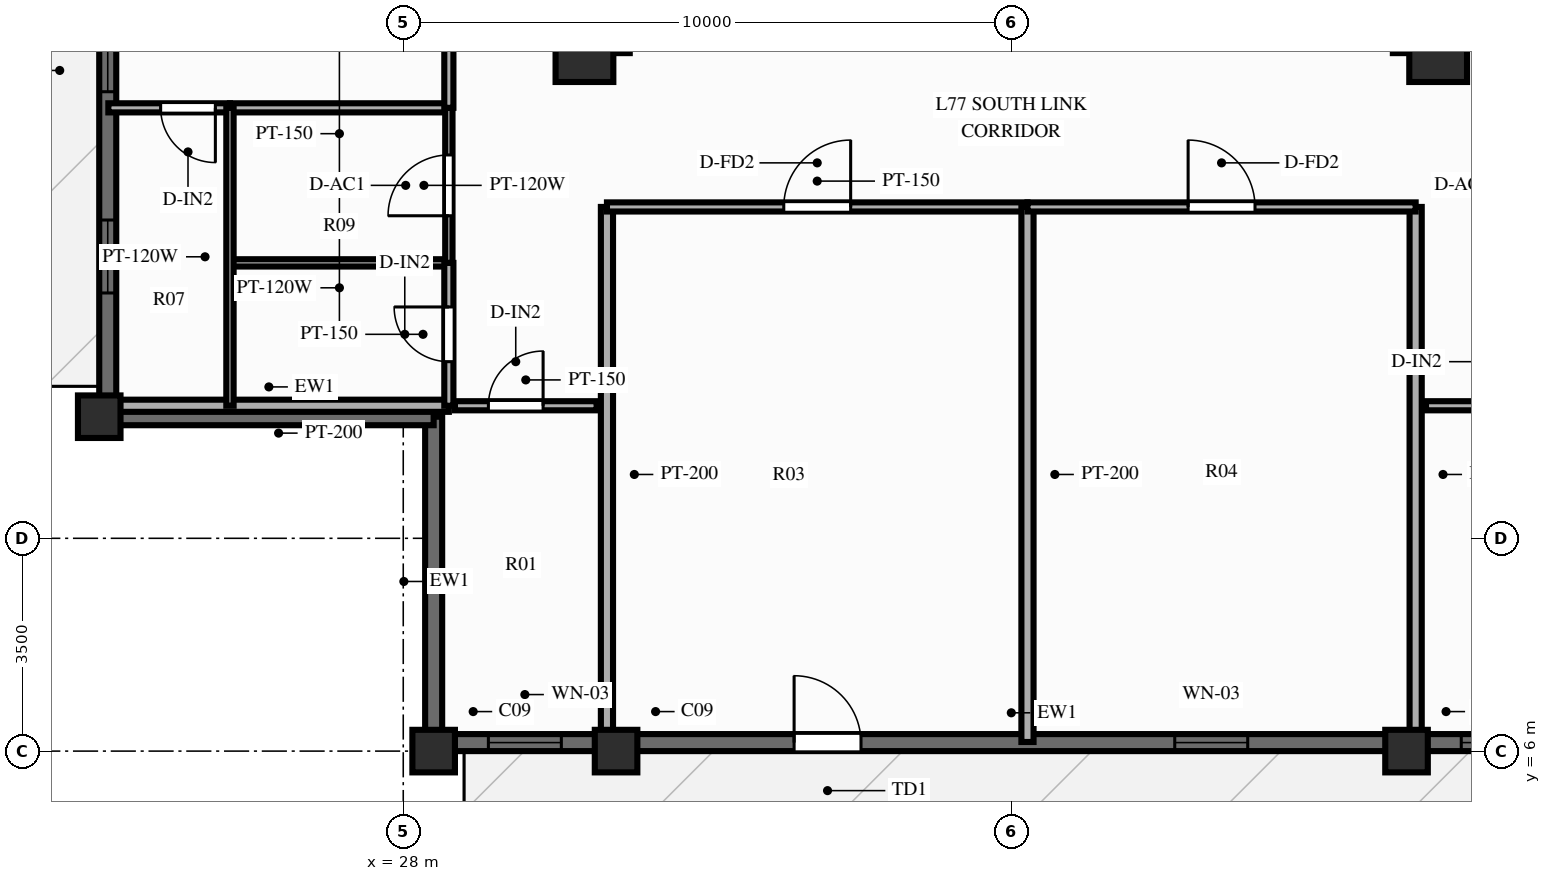
"""IFC4 building model, lengths in metres.
Left out: names, types, materials, properties, quantities, classifications, styles, units other than length and angle.
Written with IfcOpenShell. Run it as: python <this file> out.ifc"""

import sys

from ifc_helpers import new_model, si_unit, direction, frame, frame_2d, origin, origin_2d, place, context, subcontext, project, spatial, rectangle, extrude, source, transform, mapped, element, fill, save


model = new_model("IFC4")
c1 = context("Model", 3, precision=1e-05, world=origin(), true_north=direction((0.0, 1.0)))
c2 = subcontext(c1, "Body", "Model", "MODEL_VIEW")
j1 = project(units=[si_unit("LENGTHUNIT", "METRE"), si_unit("PLANEANGLEUNIT", "RADIAN")], contexts=[c1])
p1 = place(None, origin())
s1 = spatial("IfcSite", under=j1, at=p1, CompositionType="ELEMENT")
p2 = place(p1, origin())
s2 = spatial("IfcBuilding", under=s1, at=p2, CompositionType="ELEMENT")
p3 = place(p2, frame((0.0, 0.0, 249.0)))
s3 = spatial("IfcBuildingStorey", under=s2, at=p3, CompositionType="ELEMENT", Elevation=249.0)
p4 = place(p3, frame((31.5, 17.48, 0.0), z_axis=(0.0, 0.0, 1.0), x_axis=(0.0, 1.0, 0.0)))
e1 = element("IfcWall", 1, at=p4, inside=s3, PredefinedType="SHEAR", context=c2, shape_type="SweptSolid", body=[
    extrude(rectangle(XDim=19.04, YDim=0.45, at=frame_2d((9.52, 0.0))), origin(), (0.0, 0.0, 1.0), 3.2),
])
p5 = place(p4, frame((6.32, 0.0, 0.0)))
e2 = element("IfcOpeningElement", 2, at=p5, cuts=e1, PredefinedType="OPENING", context=c2, shape_type="SweptSolid", body=[
    extrude(rectangle(XDim=1.1, YDim=2.15, at=frame_2d((0.55, 1.075))), frame((0.0, 0.237, 0.0), z_axis=(0.0, -1.0, 0.0), x_axis=(1.0, 0.0, 0.0)), (0.0, 0.0, 1.0), 0.474),
])
p6 = place(p3, frame((44.5, 17.48, 0.0), z_axis=(0.0, 0.0, 1.0), x_axis=(0.0, 1.0, 0.0)))
e3 = element("IfcWall", 3, at=p6, inside=s3, PredefinedType="SHEAR", context=c2, shape_type="SweptSolid", body=[
    extrude(rectangle(XDim=19.04, YDim=0.45, at=frame_2d((9.52, 0.0))), origin(), (0.0, 0.0, 1.0), 3.2),
])
p7 = place(p6, frame((12.67, 0.0, 0.0), z_axis=(0.0, 0.0, 1.0), x_axis=(-1.0, 0.0, 0.0)))
e4 = element("IfcOpeningElement", 4, at=p7, cuts=e3, PredefinedType="OPENING", context=c2, shape_type="SweptSolid", body=[
    extrude(rectangle(XDim=1.1, YDim=2.15, at=frame_2d((0.55, 1.075))), frame((0.0, 0.237, 0.0), z_axis=(0.0, -1.0, 0.0), x_axis=(1.0, 0.0, 0.0)), (0.0, 0.0, 1.0), 0.474),
])
m1 = source(origin(), c2, "Body", "SweptSolid", [
    extrude(rectangle(XDim=0.95, YDim=0.95, at=origin_2d()), origin(), (0.0, 0.0, 1.0), 3.2),
])
for number, where, z_axis, x_axis in (
    (5, (30.98, 17.48, 0.0), (0.0, 0.0, 1.0), (1.0, 0.0, 0.0)),
    (6, (45.02, 17.48, 0.0), (0.0, 0.0, 1.0), (1.0, 0.0, 0.0)),
):
    element("IfcColumn", number, at=place(p3, frame(where, z_axis=z_axis, x_axis=x_axis)), inside=s3, PredefinedType="COLUMN", context=c2, shape_type="MappedRepresentation", body=[
        mapped(m1, transform((0.0, 0.0, 0.0), scale=1.0)),
    ])
m2 = source(origin(), c2, "Body", "SweptSolid", [
    extrude(rectangle(XDim=0.7, YDim=0.7, at=origin_2d()), origin(), (0.0, 0.0, 1.0), 3.2),
])
for number, where, z_axis, x_axis in (
    (7, (28.5, 6.0, 0.0), (0.0, 0.0, 1.0), (1.0, 0.0, 0.0)),
    (8, (31.5, 6.0, 0.0), (0.0, 0.0, 1.0), (1.0, 0.0, 0.0)),
    (9, (44.5, 6.0, 0.0), (0.0, 0.0, 1.0), (1.0, 0.0, 0.0)),
    (10, (23.0, 11.5, 0.0), (0.0, 0.0, 1.0), (1.0, 0.0, 0.0)),
):
    element("IfcColumn", number, at=place(p3, frame(where, z_axis=z_axis, x_axis=x_axis)), inside=s3, PredefinedType="COLUMN", context=c2, shape_type="MappedRepresentation", body=[
        mapped(m2, transform((0.0, 0.0, 0.0), scale=1.0)),
    ])
p8 = place(p3, frame((28.5, 6.14, 0.0), z_axis=(0.0, 0.0, 1.0), x_axis=(1.0, 0.0, 0.0)))
e11 = element("IfcWall", 11, at=p8, inside=s3, PredefinedType="SOLIDWALL", context=c2, shape_type="SweptSolid", body=[
    extrude(rectangle(XDim=19.0, YDim=0.28, at=frame_2d((9.5, 0.0))), origin(), (0.0, 0.0, 1.0), 2.48),
])
p9 = place(p8, frame((0.9, 0.0, 0.25)))
e12 = element("IfcOpeningElement", 12, at=p9, cuts=e11, PredefinedType="OPENING", context=c2, shape_type="SweptSolid", body=[
    extrude(rectangle(XDim=1.2, YDim=1.5, at=frame_2d((0.6, 0.75))), frame((0.0, 0.152, 0.0), z_axis=(0.0, -1.0, 0.0), x_axis=(1.0, 0.0, 0.0)), (0.0, 0.0, 1.0), 0.304),
])
p10 = place(p8, frame((7.028, 0.0, 0.0), z_axis=(0.0, 0.0, 1.0), x_axis=(-1.0, 0.0, 0.0)))
e13 = element("IfcOpeningElement", 13, at=p10, cuts=e11, PredefinedType="OPENING", context=c2, shape_type="SweptSolid", body=[
    extrude(rectangle(XDim=1.1, YDim=2.15, at=frame_2d((0.55, 1.075))), frame((0.0, 0.152, 0.0), z_axis=(0.0, -1.0, 0.0), x_axis=(1.0, 0.0, 0.0)), (0.0, 0.0, 1.0), 0.304),
])
p11 = place(p8, frame((12.188, 0.0, 0.25)))
e14 = element("IfcOpeningElement", 14, at=p11, cuts=e11, PredefinedType="OPENING", context=c2, shape_type="SweptSolid", body=[
    extrude(rectangle(XDim=1.2, YDim=1.5, at=frame_2d((0.6, 0.75))), frame((0.0, 0.152, 0.0), z_axis=(0.0, -1.0, 0.0), x_axis=(1.0, 0.0, 0.0)), (0.0, 0.0, 1.0), 0.304),
])
p12 = place(p8, frame((16.9, 0.0, 0.25)))
e15 = element("IfcOpeningElement", 15, at=p12, cuts=e11, PredefinedType="OPENING", context=c2, shape_type="SweptSolid", body=[
    extrude(rectangle(XDim=1.2, YDim=1.5, at=frame_2d((0.6, 0.75))), frame((0.0, 0.152, 0.0), z_axis=(0.0, -1.0, 0.0), x_axis=(1.0, 0.0, 0.0)), (0.0, 0.0, 1.0), 0.304),
])
p13 = place(p3, frame((23.14, 11.5, 0.0), z_axis=(0.0, 0.0, 1.0), x_axis=(0.0, 1.0, 0.0)))
e16 = element("IfcWall", 16, at=p13, inside=s3, PredefinedType="SOLIDWALL", context=c2, shape_type="SweptSolid", body=[
    extrude(rectangle(XDim=31.0, YDim=0.28, at=frame_2d((15.5, 0.0))), origin(), (0.0, 0.0, 1.0), 2.48),
])
p14 = place(p13, frame((2.035, 0.0, 0.25)))
e17 = element("IfcOpeningElement", 17, at=p14, cuts=e16, PredefinedType="OPENING", context=c2, shape_type="SweptSolid", body=[
    extrude(rectangle(XDim=1.2, YDim=1.5, at=frame_2d((0.6, 0.75))), frame((0.0, 0.152, 0.0), z_axis=(0.0, -1.0, 0.0), x_axis=(1.0, 0.0, 0.0)), (0.0, 0.0, 1.0), 0.304),
])
p15 = place(p13, frame((5.345, 0.0, 0.25)))
e18 = element("IfcOpeningElement", 18, at=p15, cuts=e16, PredefinedType="OPENING", context=c2, shape_type="SweptSolid", body=[
    extrude(rectangle(XDim=0.7, YDim=1.5, at=frame_2d((0.35, 0.75))), frame((0.0, 0.152, 0.0), z_axis=(0.0, -1.0, 0.0), x_axis=(1.0, 0.0, 0.0)), (0.0, 0.0, 1.0), 0.304),
])
p16 = place(p13, frame((10.295, 0.0, 0.0)))
e19 = element("IfcOpeningElement", 19, at=p16, cuts=e16, PredefinedType="OPENING", context=c2, shape_type="SweptSolid", body=[
    extrude(rectangle(XDim=1.6, YDim=2.15, at=frame_2d((0.8, 1.075))), frame((0.0, 0.152, 0.0), z_axis=(0.0, -1.0, 0.0), x_axis=(1.0, 0.0, 0.0)), (0.0, 0.0, 1.0), 0.304),
])
p17 = place(p13, frame((16.892, 0.0, 0.25)))
e20 = element("IfcOpeningElement", 20, at=p17, cuts=e16, PredefinedType="OPENING", context=c2, shape_type="SweptSolid", body=[
    extrude(rectangle(XDim=1.2, YDim=1.5, at=frame_2d((0.6, 0.75))), frame((0.0, 0.152, 0.0), z_axis=(0.0, -1.0, 0.0), x_axis=(1.0, 0.0, 0.0)), (0.0, 0.0, 1.0), 0.304),
])
p18 = place(p13, frame((21.297, 0.0, 0.25)))
e21 = element("IfcOpeningElement", 21, at=p18, cuts=e16, PredefinedType="OPENING", context=c2, shape_type="SweptSolid", body=[
    extrude(rectangle(XDim=1.2, YDim=1.5, at=frame_2d((0.6, 0.75))), frame((0.0, 0.152, 0.0), z_axis=(0.0, -1.0, 0.0), x_axis=(1.0, 0.0, 0.0)), (0.0, 0.0, 1.0), 0.304),
])
p19 = place(p13, frame((25.155, 0.0, 0.25)))
e22 = element("IfcOpeningElement", 22, at=p19, cuts=e16, PredefinedType="OPENING", context=c2, shape_type="SweptSolid", body=[
    extrude(rectangle(XDim=1.2, YDim=1.5, at=frame_2d((0.6, 0.75))), frame((0.0, 0.152, 0.0), z_axis=(0.0, -1.0, 0.0), x_axis=(1.0, 0.0, 0.0)), (0.0, 0.0, 1.0), 0.304),
])
p20 = place(p13, frame((28.215, 0.0, 0.25)))
e23 = element("IfcOpeningElement", 23, at=p20, cuts=e16, PredefinedType="OPENING", context=c2, shape_type="SweptSolid", body=[
    extrude(rectangle(XDim=1.2, YDim=1.5, at=frame_2d((0.6, 0.75))), frame((0.0, 0.152, 0.0), z_axis=(0.0, -1.0, 0.0), x_axis=(1.0, 0.0, 0.0)), (0.0, 0.0, 1.0), 0.304),
])
for number, where, z_axis, x_axis in (
    (24, (28.5, 6.08, 0.0), (0.0, 0.0, 1.0), (0.0, 1.0, 0.0)),
    (25, (23.08, 11.5, 0.0), (0.0, 0.0, 1.0), (1.0, 0.0, 0.0)),
):
    element("IfcWall", number, at=place(p3, frame(where, z_axis=z_axis, x_axis=x_axis)), inside=s3, PredefinedType="SOLIDWALL", context=c2, shape_type="SweptSolid", body=[
        extrude(rectangle(XDim=5.42, YDim=0.28, at=frame_2d((2.71, 0.0))), origin(), (0.0, 0.0, 1.0), 2.48),
    ])
p21 = place(p3, frame((28.85, 11.68, 0.0), z_axis=(0.0, 0.0, 1.0), x_axis=(1.0, 0.0, 0.0)))
e26 = element("IfcWall", 26, at=p21, inside=s3, PredefinedType="PARTITIONING", context=c2, shape_type="SweptSolid", body=[
    extrude(rectangle(XDim=2.33, YDim=0.15, at=frame_2d((1.165, 0.0))), origin(), (0.0, 0.0, 1.0), 2.88),
])
p22 = place(p21, frame((0.55, 0.0, 0.0)))
e27 = element("IfcOpeningElement", 27, at=p22, cuts=e26, PredefinedType="OPENING", context=c2, shape_type="SweptSolid", body=[
    extrude(rectangle(XDim=0.9, YDim=2.1, at=frame_2d((0.45, 1.05))), frame((0.0, 0.087, 0.0), z_axis=(0.0, -1.0, 0.0), x_axis=(1.0, 0.0, 0.0)), (0.0, 0.0, 1.0), 0.174),
])
p23 = place(p3, frame((44.82, 11.68, 0.0), z_axis=(0.0, 0.0, 1.0), x_axis=(1.0, 0.0, 0.0)))
e28 = element("IfcWall", 28, at=p23, inside=s3, PredefinedType="PARTITIONING", context=c2, shape_type="SweptSolid", body=[
    extrude(rectangle(XDim=2.33, YDim=0.15, at=frame_2d((1.165, 0.0))), origin(), (0.0, 0.0, 1.0), 2.88),
])
p24 = place(p23, frame((0.88, 0.0, 0.0)))
e29 = element("IfcOpeningElement", 29, at=p24, cuts=e28, PredefinedType="OPENING", context=c2, shape_type="SweptSolid", body=[
    extrude(rectangle(XDim=0.9, YDim=2.1, at=frame_2d((0.45, 1.05))), frame((0.0, 0.087, 0.0), z_axis=(0.0, -1.0, 0.0), x_axis=(1.0, 0.0, 0.0)), (0.0, 0.0, 1.0), 0.174),
])
for number, where, z_axis, x_axis in (
    (30, (31.35, 14.95, 0.0), (0.0, 0.0, 1.0), (0.0, -1.0, 0.0)),
    (31, (44.65, 14.95, 0.0), (0.0, 0.0, 1.0), (0.0, -1.0, 0.0)),
):
    element("IfcWall", number, at=place(p3, frame(where, z_axis=z_axis, x_axis=x_axis)), inside=s3, PredefinedType="PARTITIONING", context=c2, shape_type="SweptSolid", body=[
        extrude(rectangle(XDim=8.8, YDim=0.2, at=frame_2d((4.4, 0.0))), origin(), (0.0, 0.0, 1.0), 2.59),
    ])
p25 = place(p3, frame((31.35, 14.95, 0.0), z_axis=(0.0, 0.0, 1.0), x_axis=(1.0, 0.0, 0.0)))
e32 = element("IfcWall", 32, at=p25, inside=s3, PredefinedType="PARTITIONING", context=c2, shape_type="SweptSolid", body=[
    extrude(rectangle(XDim=6.916, YDim=0.15, at=frame_2d((3.458, 0.0))), origin(), (0.0, 0.0, 1.0), 2.88),
])
p26 = place(p25, frame((2.908, 0.0, 0.0)))
e33 = element("IfcOpeningElement", 33, at=p26, cuts=e32, PredefinedType="OPENING", context=c2, shape_type="SweptSolid", body=[
    extrude(rectangle(XDim=1.1, YDim=2.15, at=frame_2d((0.55, 1.075))), frame((0.0, 0.087, 0.0), z_axis=(0.0, -1.0, 0.0), x_axis=(1.0, 0.0, 0.0)), (0.0, 0.0, 1.0), 0.174),
])
p27 = place(p3, frame((38.266, 14.95, 0.0), z_axis=(0.0, 0.0, 1.0), x_axis=(0.0, -1.0, 0.0)))
e34 = element("IfcWall", 34, at=p27, inside=s3, PredefinedType="PARTITIONING", context=c2, shape_type="SweptSolid", body=[
    extrude(rectangle(XDim=8.8, YDim=0.2, at=frame_2d((4.4, 0.0))), origin(), (0.0, 0.0, 1.0), 2.88),
])
p28 = place(p3, frame((38.266, 14.95, 0.0), z_axis=(0.0, 0.0, 1.0), x_axis=(1.0, 0.0, 0.0)))
e35 = element("IfcWall", 35, at=p28, inside=s3, PredefinedType="PARTITIONING", context=c2, shape_type="SweptSolid", body=[
    extrude(rectangle(XDim=6.384, YDim=0.15, at=frame_2d((3.192, 0.0))), origin(), (0.0, 0.0, 1.0), 2.88),
])
p29 = place(p28, frame((2.642, 0.0, 0.0)))
e36 = element("IfcOpeningElement", 36, at=p29, cuts=e35, PredefinedType="OPENING", context=c2, shape_type="SweptSolid", body=[
    extrude(rectangle(XDim=1.1, YDim=2.15, at=frame_2d((0.55, 1.075))), frame((0.0, 0.087, 0.0), z_axis=(0.0, -1.0, 0.0), x_axis=(1.0, 0.0, 0.0)), (0.0, 0.0, 1.0), 0.174),
])
p30 = place(p3, frame((28.75, 11.68, 0.0), z_axis=(0.0, 0.0, 1.0), x_axis=(-1.0, 0.0, 0.0)))
e37 = element("IfcWall", 37, at=p30, inside=s3, PredefinedType="PARTITIONING", context=c2, shape_type="SweptSolid", body=[
    extrude(rectangle(XDim=5.6, YDim=0.2, at=frame_2d((2.8, 0.0))), origin(), (0.0, 0.0, 1.0), 2.88),
])
p31 = place(p3, frame((28.75, 14.03, 0.0), z_axis=(0.0, 0.0, 1.0), x_axis=(-1.0, 0.0, 0.0)))
e38 = element("IfcWall", 38, at=p31, inside=s3, PredefinedType="PARTITIONING", context=c2, shape_type="SweptSolid", body=[
    extrude(rectangle(XDim=3.6, YDim=0.12, at=frame_2d((1.8, 0.0))), origin(), (0.0, 0.0, 1.0), 2.88),
])
p32 = place(p3, frame((28.75, 16.58, 0.0), z_axis=(0.0, 0.0, 1.0), x_axis=(-1.0, 0.0, 0.0)))
e39 = element("IfcWall", 39, at=p32, inside=s3, PredefinedType="PARTITIONING", context=c2, shape_type="SweptSolid", body=[
    extrude(rectangle(XDim=3.6, YDim=0.15, at=frame_2d((1.8, 0.0))), origin(), (0.0, 0.0, 1.0), 2.88),
])
p33 = place(p3, frame((25.15, 16.58, 0.0), z_axis=(0.0, 0.0, 1.0), x_axis=(-1.0, 0.0, 0.0)))
e40 = element("IfcWall", 40, at=p33, inside=s3, PredefinedType="PARTITIONING", context=c2, shape_type="SweptSolid", body=[
    extrude(rectangle(XDim=2.0, YDim=0.15, at=frame_2d((1.0, 0.0))), origin(), (0.0, 0.0, 1.0), 2.88),
])
p34 = place(p33, frame((0.24, 0.0, 0.0)))
e41 = element("IfcOpeningElement", 41, at=p34, cuts=e40, PredefinedType="OPENING", context=c2, shape_type="SweptSolid", body=[
    extrude(rectangle(XDim=0.9, YDim=2.1, at=frame_2d((0.45, 1.05))), frame((0.0, 0.087, 0.0), z_axis=(0.0, -1.0, 0.0), x_axis=(1.0, 0.0, 0.0)), (0.0, 0.0, 1.0), 0.174),
])
p35 = place(p3, frame((25.15, 11.68, 0.0), z_axis=(0.0, 0.0, 1.0), x_axis=(0.0, 1.0, 0.0)))
e42 = element("IfcWall", 42, at=p35, inside=s3, PredefinedType="PARTITIONING", context=c2, shape_type="SweptSolid", body=[
    extrude(rectangle(XDim=4.9, YDim=0.12, at=frame_2d((2.45, 0.0))), origin(), (0.0, 0.0, 1.0), 2.88),
])
p36 = place(p3, frame((28.75, 11.68, 0.0), z_axis=(0.0, 0.0, 1.0), x_axis=(0.0, 1.0, 0.0)))
e43 = element("IfcWall", 43, at=p36, inside=s3, PredefinedType="PARTITIONING", context=c2, shape_type="SweptSolid", body=[
    extrude(rectangle(XDim=2.35, YDim=0.15, at=frame_2d((1.175, 0.0))), origin(), (0.0, 0.0, 1.0), 2.88),
])
p37 = place(p36, frame((0.725, 0.0, 0.0)))
e44 = element("IfcOpeningElement", 44, at=p37, cuts=e43, PredefinedType="OPENING", context=c2, shape_type="SweptSolid", body=[
    extrude(rectangle(XDim=0.9, YDim=2.1, at=frame_2d((0.45, 1.05))), frame((0.0, 0.087, 0.0), z_axis=(0.0, -1.0, 0.0), x_axis=(1.0, 0.0, 0.0)), (0.0, 0.0, 1.0), 0.174),
])
p38 = place(p3, frame((28.75, 14.03, 0.0), z_axis=(0.0, 0.0, 1.0), x_axis=(0.0, 1.0, 0.0)))
e45 = element("IfcWall", 45, at=p38, inside=s3, PredefinedType="PARTITIONING", context=c2, shape_type="SweptSolid", body=[
    extrude(rectangle(XDim=2.55, YDim=0.12, at=frame_2d((1.275, 0.0))), origin(), (0.0, 0.0, 1.0), 2.88),
])
p39 = place(p38, frame((0.775, 0.0, 0.0)))
e46 = element("IfcOpeningElement", 46, at=p39, cuts=e45, PredefinedType="OPENING", context=c2, shape_type="SweptSolid", body=[
    extrude(rectangle(XDim=1.0, YDim=2.1, at=frame_2d((0.5, 1.05))), frame((0.0, 0.072, 0.0), z_axis=(0.0, -1.0, 0.0), x_axis=(1.0, 0.0, 0.0)), (0.0, 0.0, 1.0), 0.144),
])
p40 = place(p3, frame((28.75, 16.58, 0.0), z_axis=(0.0, 0.0, 1.0), x_axis=(0.0, 1.0, 0.0)))
e47 = element("IfcWall", 47, at=p40, inside=s3, PredefinedType="PARTITIONING", context=c2, shape_type="SweptSolid", body=[
    extrude(rectangle(XDim=10.42, YDim=0.15, at=frame_2d((5.21, 0.0))), origin(), (0.0, 0.0, 1.0), 2.88),
])
p41 = place(p40, frame((4.293, 0.0, 0.0)))
e48 = element("IfcOpeningElement", 48, at=p41, cuts=e47, PredefinedType="OPENING", context=c2, shape_type="SweptSolid", body=[
    extrude(rectangle(XDim=1.1, YDim=2.15, at=frame_2d((0.55, 1.075))), frame((0.0, 0.087, 0.0), z_axis=(0.0, -1.0, 0.0), x_axis=(1.0, 0.0, 0.0)), (0.0, 0.0, 1.0), 0.174),
])
m3 = source(origin(), c2, "Body", "SweptSolid", [
    extrude(rectangle(XDim=1.2, YDim=1.5, at=frame_2d((0.6, 0.75))), frame((0.0, 0.03, 0.0), z_axis=(0.0, -1.0, 0.0), x_axis=(1.0, 0.0, 0.0)), (0.0, 0.0, 1.0), 0.06),
])
p42 = place(p9, origin())
e49 = element("IfcWindow", 49, at=p42, inside=s3, PartitioningType="SINGLE_PANEL", PredefinedType="WINDOW", context=c2, shape_type="MappedRepresentation", body=[
    mapped(m3, transform((0.0, 0.0, 0.0), scale=1.0)),
])
fill(e12, e49)
m4 = source(origin(), c2, "Body", "SweptSolid", [
    extrude(rectangle(XDim=1.1, YDim=2.15, at=frame_2d((0.55, 1.075))), frame((0.0, 0.025, 0.0), z_axis=(0.0, -1.0, 0.0), x_axis=(1.0, 0.0, 0.0)), (0.0, 0.0, 1.0), 0.05),
])
p43 = place(p10, origin())
e50 = element("IfcDoor", 50, at=p43, inside=s3, OperationType="SINGLE_SWING_RIGHT", PredefinedType="DOOR", context=c2, shape_type="MappedRepresentation", body=[
    mapped(m4, transform((0.0, 0.0, 0.0), scale=1.0)),
])
fill(e13, e50)
p44 = place(p11, origin())
e51 = element("IfcWindow", 51, at=p44, inside=s3, PartitioningType="SINGLE_PANEL", PredefinedType="WINDOW", context=c2, shape_type="MappedRepresentation", body=[
    mapped(m3, transform((0.0, 0.0, 0.0), scale=1.0)),
])
fill(e14, e51)
p45 = place(p12, origin())
e52 = element("IfcWindow", 52, at=p45, inside=s3, PartitioningType="SINGLE_PANEL", PredefinedType="WINDOW", context=c2, shape_type="MappedRepresentation", body=[
    mapped(m3, transform((0.0, 0.0, 0.0), scale=1.0)),
])
fill(e15, e52)
p46 = place(p14, origin())
e53 = element("IfcWindow", 53, at=p46, inside=s3, PartitioningType="SINGLE_PANEL", PredefinedType="WINDOW", context=c2, shape_type="MappedRepresentation", body=[
    mapped(m3, transform((0.0, 0.0, 0.0), scale=1.0)),
])
fill(e17, e53)
m5 = source(origin(), c2, "Body", "SweptSolid", [
    extrude(rectangle(XDim=0.7, YDim=1.5, at=frame_2d((0.35, 0.75))), frame((0.0, 0.03, 0.0), z_axis=(0.0, -1.0, 0.0), x_axis=(1.0, 0.0, 0.0)), (0.0, 0.0, 1.0), 0.06),
])
p47 = place(p15, origin())
e54 = element("IfcWindow", 54, at=p47, inside=s3, PartitioningType="SINGLE_PANEL", PredefinedType="WINDOW", context=c2, shape_type="MappedRepresentation", body=[
    mapped(m5, transform((0.0, 0.0, 0.0), scale=1.0)),
])
fill(e18, e54)
m6 = source(origin(), c2, "Body", "SweptSolid", [
    extrude(rectangle(XDim=0.9, YDim=2.1, at=frame_2d((0.45, 1.05))), frame((0.0, 0.025, 0.0), z_axis=(0.0, -1.0, 0.0), x_axis=(1.0, 0.0, 0.0)), (0.0, 0.0, 1.0), 0.05),
])
p48 = place(p22, origin())
e55 = element("IfcDoor", 55, at=p48, inside=s3, OperationType="SINGLE_SWING_RIGHT", PredefinedType="DOOR", context=c2, shape_type="MappedRepresentation", body=[
    mapped(m6, transform((0.0, 0.0, 0.0), scale=1.0)),
])
fill(e27, e55)
p49 = place(p26, origin())
e56 = element("IfcDoor", 56, at=p49, inside=s3, OperationType="SINGLE_SWING_RIGHT", PredefinedType="DOOR", context=c2, shape_type="MappedRepresentation", body=[
    mapped(m4, transform((0.0, 0.0, 0.0), scale=1.0)),
])
fill(e33, e56)
p50 = place(p29, origin())
e57 = element("IfcDoor", 57, at=p50, inside=s3, OperationType="SINGLE_SWING_LEFT", PredefinedType="DOOR", context=c2, shape_type="MappedRepresentation", body=[
    mapped(m4, transform((0.0, 0.0, 0.0), scale=1.0)),
])
fill(e36, e57)
p51 = place(p34, origin())
e58 = element("IfcDoor", 58, at=p51, inside=s3, OperationType="SINGLE_SWING_LEFT", PredefinedType="DOOR", context=c2, shape_type="MappedRepresentation", body=[
    mapped(m6, transform((0.0, 0.0, 0.0), scale=1.0)),
])
fill(e41, e58)
p52 = place(p37, origin())
e59 = element("IfcDoor", 59, at=p52, inside=s3, OperationType="SINGLE_SWING_RIGHT", PredefinedType="DOOR", context=c2, shape_type="MappedRepresentation", body=[
    mapped(m6, transform((0.0, 0.0, 0.0), scale=1.0)),
])
fill(e44, e59)
m7 = source(origin(), c2, "Body", "SweptSolid", [
    extrude(rectangle(XDim=1.0, YDim=2.1, at=frame_2d((0.5, 1.05))), frame((0.0, 0.025, 0.0), z_axis=(0.0, -1.0, 0.0), x_axis=(1.0, 0.0, 0.0)), (0.0, 0.0, 1.0), 0.05),
])
p53 = place(p39, origin())
e60 = element("IfcDoor", 60, at=p53, inside=s3, OperationType="SINGLE_SWING_LEFT", PredefinedType="DOOR", context=c2, shape_type="MappedRepresentation", body=[
    mapped(m7, transform((0.0, 0.0, 0.0), scale=1.0)),
])
fill(e46, e60)
save(model, sys.argv[1])
